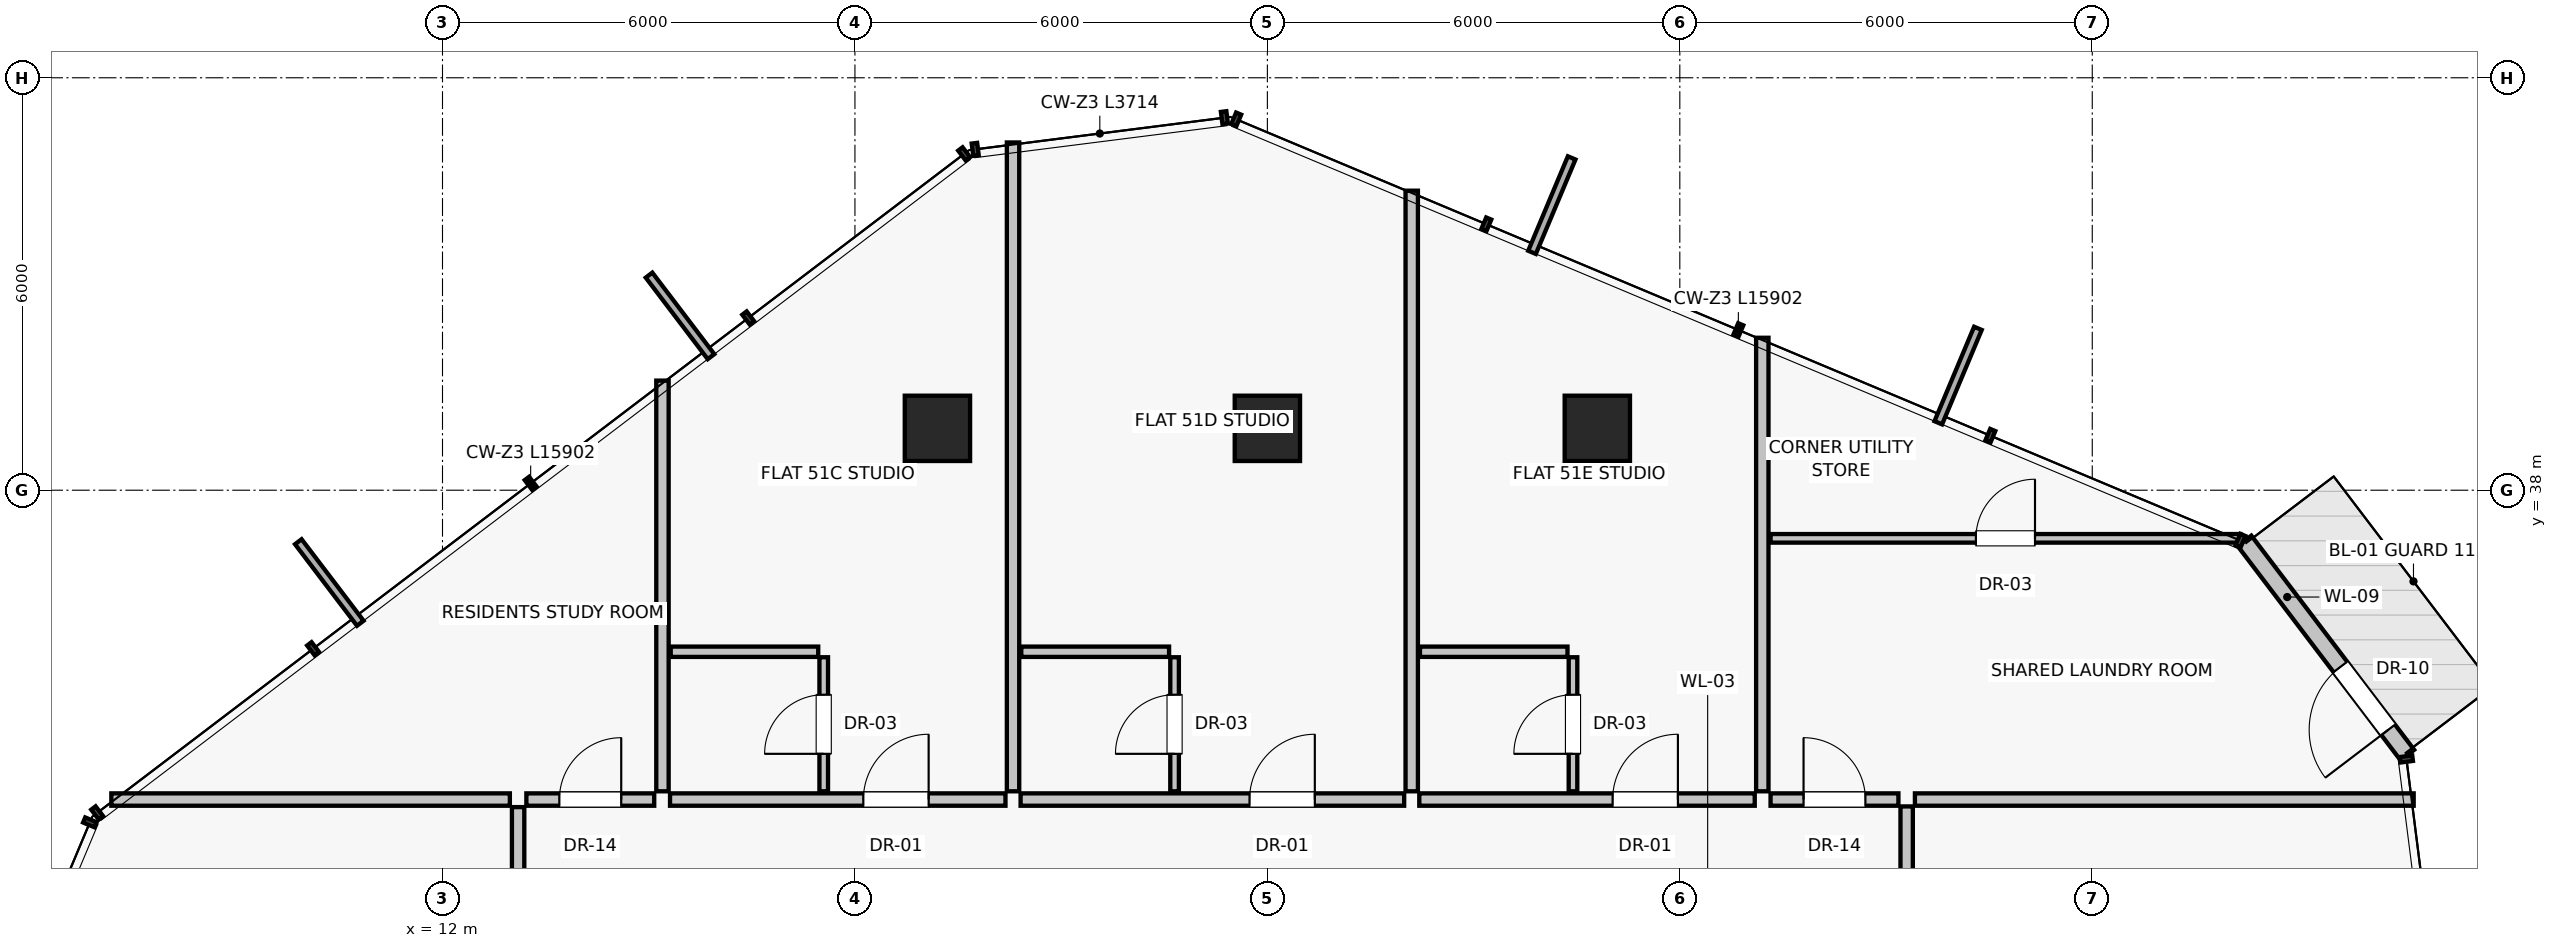
"""IFC4 building model, lengths in metres.
Left out: names, types, materials, properties, quantities, classifications, styles, units other than length and angle.
Written with IfcOpenShell. Run it as: python <this file> out.ifc"""

import sys

from ifc_helpers import new_model, si_unit, direction, frame, frame_2d, origin, origin_2d, place, context, subcontext, project, spatial, rectangle, extrude, source, transform, mapped, element, fill, save


model = new_model("IFC4")
c1 = context("Model", 3, precision=1e-05, world=origin(), true_north=direction((0.0, 1.0)))
c2 = subcontext(c1, "Body", "Model", "MODEL_VIEW")
j1 = project(units=[si_unit("LENGTHUNIT", "METRE"), si_unit("PLANEANGLEUNIT", "RADIAN")], contexts=[c1])
p1 = place(None, origin())
s1 = spatial("IfcSite", under=j1, at=p1, CompositionType="ELEMENT")
p2 = place(p1, origin())
s2 = spatial("IfcBuilding", under=s1, at=p2, CompositionType="ELEMENT")
p3 = place(p2, frame((0.0, 0.0, 182.1)))
s3 = spatial("IfcBuildingStorey", under=s2, at=p3, CompositionType="ELEMENT", Elevation=182.1)
for number, where, z_axis, x_axis in (
    (1, (28.8, 38.9, 0.0), (0.0, 0.0, 1.0), (1.0, 0.0, 0.0)),
    (2, (24.0, 38.9, 0.0), (0.0, 0.0, 1.0), (1.0, 0.0, 0.0)),
    (3, (19.2, 38.9, 0.0), (0.0, 0.0, 1.0), (1.0, 0.0, 0.0)),
):
    element("IfcColumn", number, at=place(p3, frame(where, z_axis=z_axis, x_axis=x_axis)), inside=s3, PredefinedType="COLUMN", context=c2, shape_type="SweptSolid", body=[
        extrude(rectangle(XDim=0.95, YDim=0.95, at=origin_2d()), origin(), (0.0, 0.0, 1.0), 3.25),
    ])
p4 = place(p3, frame((40.583, 34.147, 0.0), z_axis=(0.0, 0.0, 1.0), x_axis=(-0.605137035465, 0.796121327631, 0.0)))
e4 = element("IfcWall", 4, at=p4, inside=s3, PredefinedType="SOLIDWALL", context=c2, shape_type="SweptSolid", body=[
    extrude(rectangle(XDim=3.914, YDim=0.25, at=frame_2d((1.957, 0.0))), origin(), (0.0, 0.0, 1.0), 3.015),
])
p5 = place(p4, frame((0.46, 0.0, 0.0)))
e5 = element("IfcOpeningElement", 5, at=p5, cuts=e4, PredefinedType="OPENING", context=c2, shape_type="SweptSolid", body=[
    extrude(rectangle(XDim=1.15, YDim=2.25, at=frame_2d((0.575, 1.125))), frame((0.0, 0.135, 0.0), z_axis=(0.0, -1.0, 0.0), x_axis=(1.0, 0.0, 0.0)), (0.0, 0.0, 1.0), 0.27),
])
p6 = place(p3, frame((15.2, 33.62, 0.0), z_axis=(0.0, 0.0, 1.0), x_axis=(0.0, 1.0, 0.0)))
e6 = element("IfcWall", 6, at=p6, inside=s3, PredefinedType="PARTITIONING", context=c2, shape_type="SweptSolid", body=[
    extrude(rectangle(XDim=5.974, YDim=0.18, at=frame_2d((2.987, 0.0))), origin(), (0.0, 0.0, 1.0), 3.015),
])
p7 = place(p3, frame((31.2, 33.62, 0.0), z_axis=(0.0, 0.0, 1.0), x_axis=(0.0, 1.0, 0.0)))
e7 = element("IfcWall", 7, at=p7, inside=s3, PredefinedType="PARTITIONING", context=c2, shape_type="SweptSolid", body=[
    extrude(rectangle(XDim=6.597, YDim=0.18, at=frame_2d((3.299, 0.0))), origin(), (0.0, 0.0, 1.0), 3.015),
])
p8 = place(p3, frame((15.31, 33.5, 0.0), z_axis=(0.0, 0.0, 1.0), x_axis=(1.0, 0.0, 0.0)))
e8 = element("IfcWall", 8, at=p8, inside=s3, PredefinedType="PARTITIONING", context=c2, shape_type="SweptSolid", body=[
    extrude(rectangle(XDim=4.88, YDim=0.18, at=frame_2d((2.44, 0.0))), origin(), (0.0, 0.0, 1.0), 3.015),
])
p9 = place(p8, frame((2.812, 0.0, 0.0)))
e9 = element("IfcOpeningElement", 9, at=p9, cuts=e8, PredefinedType="OPENING", context=c2, shape_type="SweptSolid", body=[
    extrude(rectangle(XDim=0.95, YDim=2.02, at=frame_2d((0.475, 1.01))), frame((0.0, 0.1, 0.0), z_axis=(0.0, -1.0, 0.0), x_axis=(1.0, 0.0, 0.0)), (0.0, 0.0, 1.0), 0.2),
])
p10 = place(p3, frame((17.546, 33.62, 0.0), z_axis=(0.0, 0.0, 1.0), x_axis=(0.0, 1.0, 0.0)))
e10 = element("IfcWall", 10, at=p10, inside=s3, PredefinedType="PARTITIONING", context=c2, shape_type="SweptSolid", body=[
    extrude(rectangle(XDim=1.95, YDim=0.125, at=frame_2d((0.975, 0.0))), origin(), (0.0, 0.0, 1.0), 3.015),
])
p11 = place(p10, frame((0.545, 0.0, 0.0)))
e11 = element("IfcOpeningElement", 11, at=p11, cuts=e10, PredefinedType="OPENING", context=c2, shape_type="SweptSolid", body=[
    extrude(rectangle(XDim=0.86, YDim=2.01, at=frame_2d((0.43, 1.005))), frame((0.0, 0.073, 0.0), z_axis=(0.0, -1.0, 0.0), x_axis=(1.0, 0.0, 0.0)), (0.0, 0.0, 1.0), 0.145),
])
p12 = place(p3, frame((15.32, 35.65, 0.0), z_axis=(0.0, 0.0, 1.0), x_axis=(1.0, 0.0, 0.0)))
e12 = element("IfcWall", 12, at=p12, inside=s3, PredefinedType="PARTITIONING", context=c2, shape_type="SweptSolid", body=[
    extrude(rectangle(XDim=2.146, YDim=0.15, at=frame_2d((1.073, 0.0))), origin(), (0.0, 0.0, 1.0), 3.015),
])
p13 = place(p3, frame((20.3, 33.62, 0.0), z_axis=(0.0, 0.0, 1.0), x_axis=(0.0, 1.0, 0.0)))
e13 = element("IfcWall", 13, at=p13, inside=s3, PredefinedType="PARTITIONING", context=c2, shape_type="SweptSolid", body=[
    extrude(rectangle(XDim=9.439, YDim=0.18, at=frame_2d((4.719, 0.0))), origin(), (0.0, 0.0, 1.0), 2.469),
])
p14 = place(p3, frame((20.41, 33.5, 0.0), z_axis=(0.0, 0.0, 1.0), x_axis=(1.0, 0.0, 0.0)))
e14 = element("IfcWall", 14, at=p14, inside=s3, PredefinedType="PARTITIONING", context=c2, shape_type="SweptSolid", body=[
    extrude(rectangle(XDim=5.58, YDim=0.18, at=frame_2d((2.79, 0.0))), origin(), (0.0, 0.0, 1.0), 3.015),
])
p15 = place(p14, frame((3.33, 0.0, 0.0)))
e15 = element("IfcOpeningElement", 15, at=p15, cuts=e14, PredefinedType="OPENING", context=c2, shape_type="SweptSolid", body=[
    extrude(rectangle(XDim=0.95, YDim=2.02, at=frame_2d((0.475, 1.01))), frame((0.0, 0.1, 0.0), z_axis=(0.0, -1.0, 0.0), x_axis=(1.0, 0.0, 0.0)), (0.0, 0.0, 1.0), 0.2),
])
p16 = place(p3, frame((22.65, 33.62, 0.0), z_axis=(0.0, 0.0, 1.0), x_axis=(0.0, 1.0, 0.0)))
e16 = element("IfcWall", 16, at=p16, inside=s3, PredefinedType="PARTITIONING", context=c2, shape_type="SweptSolid", body=[
    extrude(rectangle(XDim=1.95, YDim=0.125, at=frame_2d((0.975, 0.0))), origin(), (0.0, 0.0, 1.0), 3.015),
])
p17 = place(p16, frame((0.545, 0.0, 0.0)))
e17 = element("IfcOpeningElement", 17, at=p17, cuts=e16, PredefinedType="OPENING", context=c2, shape_type="SweptSolid", body=[
    extrude(rectangle(XDim=0.86, YDim=2.01, at=frame_2d((0.43, 1.005))), frame((0.0, 0.073, 0.0), z_axis=(0.0, -1.0, 0.0), x_axis=(1.0, 0.0, 0.0)), (0.0, 0.0, 1.0), 0.145),
])
p18 = place(p3, frame((20.42, 35.65, 0.0), z_axis=(0.0, 0.0, 1.0), x_axis=(1.0, 0.0, 0.0)))
e18 = element("IfcWall", 18, at=p18, inside=s3, PredefinedType="PARTITIONING", context=c2, shape_type="SweptSolid", body=[
    extrude(rectangle(XDim=2.15, YDim=0.15, at=frame_2d((1.075, 0.0))), origin(), (0.0, 0.0, 1.0), 2.662),
])
p19 = place(p3, frame((26.1, 33.62, 0.0), z_axis=(0.0, 0.0, 1.0), x_axis=(0.0, 1.0, 0.0)))
e19 = element("IfcWall", 19, at=p19, inside=s3, PredefinedType="PARTITIONING", context=c2, shape_type="SweptSolid", body=[
    extrude(rectangle(XDim=8.737, YDim=0.18, at=frame_2d((4.369, 0.0))), origin(), (0.0, 0.0, 1.0), 3.015),
])
p20 = place(p3, frame((26.21, 33.5, 0.0), z_axis=(0.0, 0.0, 1.0), x_axis=(1.0, 0.0, 0.0)))
e20 = element("IfcWall", 20, at=p20, inside=s3, PredefinedType="PARTITIONING", context=c2, shape_type="SweptSolid", body=[
    extrude(rectangle(XDim=4.88, YDim=0.18, at=frame_2d((2.44, 0.0))), origin(), (0.0, 0.0, 1.0), 3.015),
])
p21 = place(p20, frame((2.812, 0.0, 0.0)))
e21 = element("IfcOpeningElement", 21, at=p21, cuts=e20, PredefinedType="OPENING", context=c2, shape_type="SweptSolid", body=[
    extrude(rectangle(XDim=0.95, YDim=2.02, at=frame_2d((0.475, 1.01))), frame((0.0, 0.1, 0.0), z_axis=(0.0, -1.0, 0.0), x_axis=(1.0, 0.0, 0.0)), (0.0, 0.0, 1.0), 0.2),
])
p22 = place(p3, frame((28.446, 33.62, 0.0), z_axis=(0.0, 0.0, 1.0), x_axis=(0.0, 1.0, 0.0)))
e22 = element("IfcWall", 22, at=p22, inside=s3, PredefinedType="PARTITIONING", context=c2, shape_type="SweptSolid", body=[
    extrude(rectangle(XDim=1.95, YDim=0.125, at=frame_2d((0.975, 0.0))), origin(), (0.0, 0.0, 1.0), 3.015),
])
p23 = place(p22, frame((0.545, 0.0, 0.0)))
e23 = element("IfcOpeningElement", 23, at=p23, cuts=e22, PredefinedType="OPENING", context=c2, shape_type="SweptSolid", body=[
    extrude(rectangle(XDim=0.86, YDim=2.01, at=frame_2d((0.43, 1.005))), frame((0.0, 0.073, 0.0), z_axis=(0.0, -1.0, 0.0), x_axis=(1.0, 0.0, 0.0)), (0.0, 0.0, 1.0), 0.145),
])
p24 = place(p3, frame((26.22, 35.65, 0.0), z_axis=(0.0, 0.0, 1.0), x_axis=(1.0, 0.0, 0.0)))
e24 = element("IfcWall", 24, at=p24, inside=s3, PredefinedType="PARTITIONING", context=c2, shape_type="SweptSolid", body=[
    extrude(rectangle(XDim=2.146, YDim=0.15, at=frame_2d((1.073, 0.0))), origin(), (0.0, 0.0, 1.0), 2.662),
])
p25 = place(p3, frame((12.98, 33.5, 0.0), z_axis=(0.0, 0.0, 1.0), x_axis=(-1.0, 0.0, 0.0)))
e25 = element("IfcWall", 25, at=p25, inside=s3, PredefinedType="PARTITIONING", context=c2, shape_type="SweptSolid", body=[
    extrude(rectangle(XDim=5.797, YDim=0.18, at=frame_2d((2.899, 0.0))), origin(), (0.0, 0.0, 1.0), 3.015),
])
p26 = place(p3, frame((13.1, 28.119, 0.0), z_axis=(0.0, 0.0, 1.0), x_axis=(0.0, 1.0, 0.0)))
e26 = element("IfcWall", 26, at=p26, inside=s3, PredefinedType="PARTITIONING", context=c2, shape_type="SweptSolid", body=[
    extrude(rectangle(XDim=5.271, YDim=0.18, at=frame_2d((2.635, 0.0))), origin(), (0.0, 0.0, 1.0), 2.662),
])
p27 = place(p26, frame((2.135, 0.0, 0.0)))
e27 = element("IfcOpeningElement", 27, at=p27, cuts=e26, PredefinedType="OPENING", context=c2, shape_type="SweptSolid", body=[
    extrude(rectangle(XDim=1.0, YDim=2.01, at=frame_2d((0.5, 1.005))), frame((0.0, 0.1, 0.0), z_axis=(0.0, -1.0, 0.0), x_axis=(1.0, 0.0, 0.0)), (0.0, 0.0, 1.0), 0.2),
])
p28 = place(p3, frame((33.3, 31.5, 0.0), z_axis=(0.0, 0.0, 1.0), x_axis=(0.0, 1.0, 0.0)))
e28 = element("IfcWall", 28, at=p28, inside=s3, PredefinedType="PARTITIONING", context=c2, shape_type="SweptSolid", body=[
    extrude(rectangle(XDim=1.9, YDim=0.18, at=frame_2d((0.95, 0.0))), origin(), (0.0, 0.0, 1.0), 3.015),
])
p29 = place(p3, frame((13.22, 33.5, 0.0), z_axis=(0.0, 0.0, 1.0), x_axis=(1.0, 0.0, 0.0)))
e29 = element("IfcWall", 29, at=p29, inside=s3, PredefinedType="PARTITIONING", context=c2, shape_type="SweptSolid", body=[
    extrude(rectangle(XDim=1.86, YDim=0.18, at=frame_2d((0.93, 0.0))), origin(), (0.0, 0.0, 1.0), 3.015),
])
p30 = place(p29, frame((0.48, 0.0, 0.0)))
e30 = element("IfcOpeningElement", 30, at=p30, cuts=e29, PredefinedType="OPENING", context=c2, shape_type="SweptSolid", body=[
    extrude(rectangle(XDim=0.9, YDim=2.01, at=frame_2d((0.45, 1.005))), frame((0.0, 0.1, 0.0), z_axis=(0.0, -1.0, 0.0), x_axis=(1.0, 0.0, 0.0)), (0.0, 0.0, 1.0), 0.2),
])
p31 = place(p3, frame((33.42, 33.5, 0.0), z_axis=(0.0, 0.0, 1.0), x_axis=(1.0, 0.0, 0.0)))
e31 = element("IfcWall", 31, at=p31, inside=s3, PredefinedType="PARTITIONING", context=c2, shape_type="SweptSolid", body=[
    extrude(rectangle(XDim=7.256, YDim=0.18, at=frame_2d((3.628, 0.0))), origin(), (0.0, 0.0, 1.0), 3.015),
])
p32 = place(p3, frame((31.32, 33.5, 0.0), z_axis=(0.0, 0.0, 1.0), x_axis=(1.0, 0.0, 0.0)))
e32 = element("IfcWall", 32, at=p32, inside=s3, PredefinedType="PARTITIONING", context=c2, shape_type="SweptSolid", body=[
    extrude(rectangle(XDim=1.86, YDim=0.18, at=frame_2d((0.93, 0.0))), origin(), (0.0, 0.0, 1.0), 3.015),
])
p33 = place(p32, frame((0.48, 0.0, 0.0)))
e33 = element("IfcOpeningElement", 33, at=p33, cuts=e32, PredefinedType="OPENING", context=c2, shape_type="SweptSolid", body=[
    extrude(rectangle(XDim=0.9, YDim=2.01, at=frame_2d((0.45, 1.005))), frame((0.0, 0.1, 0.0), z_axis=(0.0, -1.0, 0.0), x_axis=(1.0, 0.0, 0.0)), (0.0, 0.0, 1.0), 0.2),
])
p34 = place(p3, frame((31.32, 37.3, 0.0), z_axis=(0.0, 0.0, 1.0), x_axis=(1.0, 0.0, 0.0)))
e34 = element("IfcWall", 34, at=p34, inside=s3, PredefinedType="PARTITIONING", context=c2, shape_type="SweptSolid", body=[
    extrude(rectangle(XDim=6.834, YDim=0.125, at=frame_2d((3.417, 0.0))), origin(), (0.0, 0.0, 1.0), 3.015),
])
p35 = place(p34, frame((2.987, 0.0, 0.0)))
e35 = element("IfcOpeningElement", 35, at=p35, cuts=e34, PredefinedType="OPENING", context=c2, shape_type="SweptSolid", body=[
    extrude(rectangle(XDim=0.86, YDim=2.01, at=frame_2d((0.43, 1.005))), frame((0.0, 0.073, 0.0), z_axis=(0.0, -1.0, 0.0), x_axis=(1.0, 0.0, 0.0)), (0.0, 0.0, 1.0), 0.145),
])
m1 = source(origin(), c2, "Body", "SweptSolid", [
    extrude(rectangle(XDim=1.15, YDim=2.25, at=frame_2d((0.575, 1.125))), frame((0.0, 0.025, 0.0), z_axis=(0.0, -1.0, 0.0), x_axis=(1.0, 0.0, 0.0)), (0.0, 0.0, 1.0), 0.05),
])
p36 = place(p5, frame((1.15, 0.0, 0.0), z_axis=(0.0, 0.0, 1.0), x_axis=(-1.0, 0.0, 0.0)))
e36 = element("IfcDoor", 36, at=p36, inside=s3, OperationType="SINGLE_SWING_LEFT", PredefinedType="DOOR", context=c2, shape_type="MappedRepresentation", body=[
    mapped(m1, transform((0.0, 0.0, 0.0), scale=1.0)),
])
fill(e5, e36)
m2 = source(origin(), c2, "Body", "SweptSolid", [
    extrude(rectangle(XDim=0.95, YDim=2.02, at=frame_2d((0.475, 1.01))), frame((0.0, 0.025, 0.0), z_axis=(0.0, -1.0, 0.0), x_axis=(1.0, 0.0, 0.0)), (0.0, 0.0, 1.0), 0.05),
])
p37 = place(p9, origin())
e37 = element("IfcDoor", 37, at=p37, inside=s3, OperationType="SINGLE_SWING_RIGHT", PredefinedType="DOOR", context=c2, shape_type="MappedRepresentation", body=[
    mapped(m2, transform((0.0, 0.0, 0.0), scale=1.0)),
])
fill(e9, e37)
m3 = source(origin(), c2, "Body", "SweptSolid", [
    extrude(rectangle(XDim=0.86, YDim=2.01, at=frame_2d((0.43, 1.005))), frame((0.0, 0.025, 0.0), z_axis=(0.0, -1.0, 0.0), x_axis=(1.0, 0.0, 0.0)), (0.0, 0.0, 1.0), 0.05),
])
p38 = place(p11, origin())
e38 = element("IfcDoor", 38, at=p38, inside=s3, OperationType="SINGLE_SWING_LEFT", PredefinedType="DOOR", context=c2, shape_type="MappedRepresentation", body=[
    mapped(m3, transform((0.0, 0.0, 0.0), scale=1.0)),
])
fill(e11, e38)
p39 = place(p15, origin())
e39 = element("IfcDoor", 39, at=p39, inside=s3, OperationType="SINGLE_SWING_RIGHT", PredefinedType="DOOR", context=c2, shape_type="MappedRepresentation", body=[
    mapped(m2, transform((0.0, 0.0, 0.0), scale=1.0)),
])
fill(e15, e39)
p40 = place(p17, origin())
e40 = element("IfcDoor", 40, at=p40, inside=s3, OperationType="SINGLE_SWING_LEFT", PredefinedType="DOOR", context=c2, shape_type="MappedRepresentation", body=[
    mapped(m3, transform((0.0, 0.0, 0.0), scale=1.0)),
])
fill(e17, e40)
p41 = place(p21, origin())
e41 = element("IfcDoor", 41, at=p41, inside=s3, OperationType="SINGLE_SWING_RIGHT", PredefinedType="DOOR", context=c2, shape_type="MappedRepresentation", body=[
    mapped(m2, transform((0.0, 0.0, 0.0), scale=1.0)),
])
fill(e21, e41)
p42 = place(p23, origin())
e42 = element("IfcDoor", 42, at=p42, inside=s3, OperationType="SINGLE_SWING_LEFT", PredefinedType="DOOR", context=c2, shape_type="MappedRepresentation", body=[
    mapped(m3, transform((0.0, 0.0, 0.0), scale=1.0)),
])
fill(e23, e42)
m4 = source(origin(), c2, "Body", "SweptSolid", [
    extrude(rectangle(XDim=0.9, YDim=2.01, at=frame_2d((0.45, 1.005))), frame((0.0, 0.025, 0.0), z_axis=(0.0, -1.0, 0.0), x_axis=(1.0, 0.0, 0.0)), (0.0, 0.0, 1.0), 0.05),
])
p43 = place(p30, origin())
e43 = element("IfcDoor", 43, at=p43, inside=s3, OperationType="SINGLE_SWING_RIGHT", PredefinedType="DOOR", context=c2, shape_type="MappedRepresentation", body=[
    mapped(m4, transform((0.0, 0.0, 0.0), scale=1.0)),
])
fill(e30, e43)
p44 = place(p33, origin())
e44 = element("IfcDoor", 44, at=p44, inside=s3, OperationType="SINGLE_SWING_LEFT", PredefinedType="DOOR", context=c2, shape_type="MappedRepresentation", body=[
    mapped(m4, transform((0.0, 0.0, 0.0), scale=1.0)),
])
fill(e33, e44)
p45 = place(p35, origin())
e45 = element("IfcDoor", 45, at=p45, inside=s3, OperationType="SINGLE_SWING_RIGHT", PredefinedType="DOOR", context=c2, shape_type="MappedRepresentation", body=[
    mapped(m3, transform((0.0, 0.0, 0.0), scale=1.0)),
])
fill(e35, e45)
save(model, sys.argv[1])
